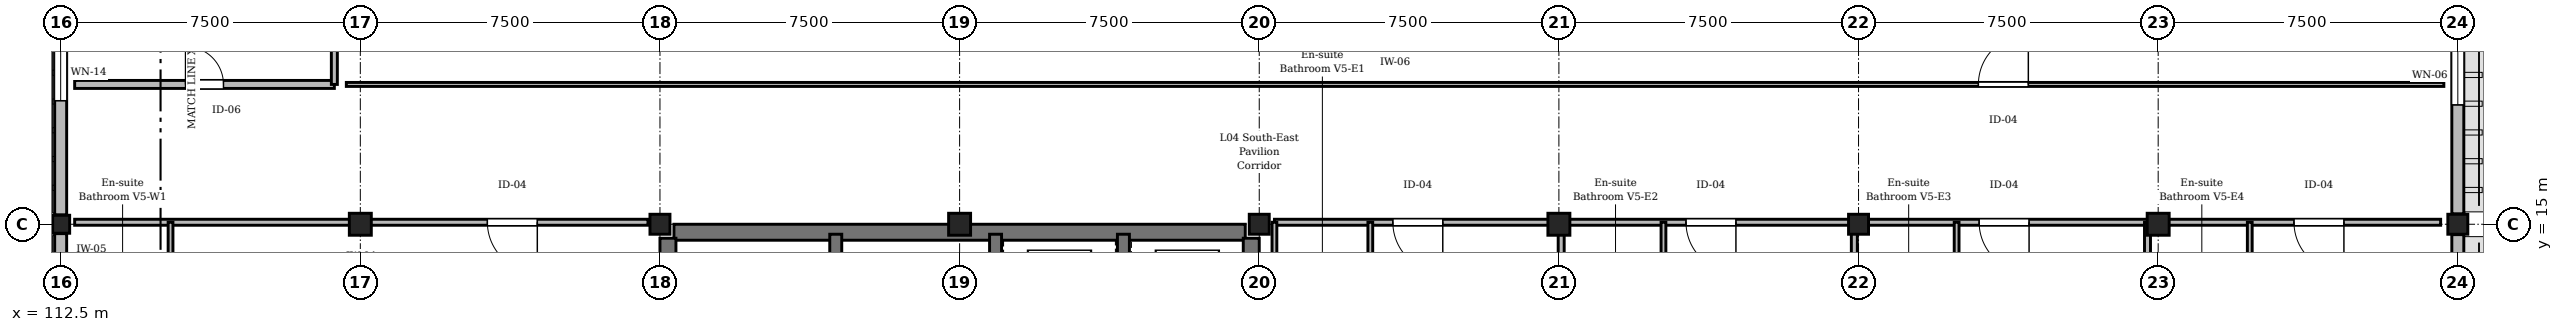
"""IFC4 building model, lengths in metres.
Left out: names, types, materials, properties, quantities, classifications, styles, units other than length and angle.
Written with IfcOpenShell. Run it as: python <this file> out.ifc"""

import sys

from ifc_helpers import new_model, si_unit, direction, frame, frame_2d, origin, origin_2d, place, context, subcontext, project, spatial, rectangle, extrude, element, fill, save


model = new_model("IFC4")
c1 = context("Model", 3, precision=1e-05, world=origin(), true_north=direction((0.0, 1.0)))
c2 = subcontext(c1, "Body", "Model", "MODEL_VIEW")
j1 = project(units=[si_unit("LENGTHUNIT", "METRE"), si_unit("PLANEANGLEUNIT", "RADIAN")], contexts=[c1])
p1 = place(None, origin())
s1 = spatial("IfcSite", under=j1, at=p1, CompositionType="ELEMENT")
p2 = place(p1, origin())
s2 = spatial("IfcBuilding", under=s1, at=p2, CompositionType="ELEMENT")
p3 = place(p2, frame((0.0, 0.0, 17.85)))
s3 = spatial("IfcBuildingStorey", under=s2, at=p3, CompositionType="ELEMENT", Elevation=17.85)
p4 = place(p3, frame((112.5, 15.0, 0.0), z_axis=(0.0, 0.0, 1.0), x_axis=(1.0, 0.0, 0.0)))
e1 = element("IfcColumn", 1, at=p4, inside=s3, PredefinedType="COLUMN", context=c2, shape_type="SweptSolid", body=[
    extrude(rectangle(XDim=0.45, YDim=0.45, at=origin_2d()), origin(), (0.0, 0.0, 1.0), 4.05),
])
p5 = place(p3, frame((120.0, 15.0, 0.0), z_axis=(0.0, 0.0, 1.0), x_axis=(1.0, 0.0, 0.0)))
e2 = element("IfcColumn", 2, at=p5, inside=s3, PredefinedType="COLUMN", context=c2, shape_type="SweptSolid", body=[
    extrude(rectangle(XDim=0.55, YDim=0.55, at=origin_2d()), origin(), (0.0, 0.0, 1.0), 4.05),
])
p6 = place(p3, frame((127.5, 15.0, 0.0), z_axis=(0.0, 0.0, 1.0), x_axis=(1.0, 0.0, 0.0)))
e3 = element("IfcColumn", 3, at=p6, inside=s3, PredefinedType="COLUMN", context=c2, shape_type="SweptSolid", body=[
    extrude(rectangle(XDim=0.5, YDim=0.5, at=origin_2d()), origin(), (0.0, 0.0, 1.0), 4.05),
])
p7 = place(p3, frame((135.0, 15.0, 0.0), z_axis=(0.0, 0.0, 1.0), x_axis=(1.0, 0.0, 0.0)))
e4 = element("IfcColumn", 4, at=p7, inside=s3, PredefinedType="COLUMN", context=c2, shape_type="SweptSolid", body=[
    extrude(rectangle(XDim=0.55, YDim=0.55, at=origin_2d()), origin(), (0.0, 0.0, 1.0), 4.05),
])
p8 = place(p3, frame((142.5, 15.0, 0.0), z_axis=(0.0, 0.0, 1.0), x_axis=(1.0, 0.0, 0.0)))
e5 = element("IfcColumn", 5, at=p8, inside=s3, PredefinedType="COLUMN", context=c2, shape_type="SweptSolid", body=[
    extrude(rectangle(XDim=0.5, YDim=0.5, at=origin_2d()), origin(), (0.0, 0.0, 1.0), 4.05),
])
p9 = place(p3, frame((150.0, 15.0, 0.0), z_axis=(0.0, 0.0, 1.0), x_axis=(1.0, 0.0, 0.0)))
e6 = element("IfcColumn", 6, at=p9, inside=s3, PredefinedType="COLUMN", context=c2, shape_type="SweptSolid", body=[
    extrude(rectangle(XDim=0.55, YDim=0.55, at=origin_2d()), origin(), (0.0, 0.0, 1.0), 4.05),
])
p10 = place(p3, frame((157.5, 15.0, 0.0), z_axis=(0.0, 0.0, 1.0), x_axis=(1.0, 0.0, 0.0)))
e7 = element("IfcColumn", 7, at=p10, inside=s3, PredefinedType="COLUMN", context=c2, shape_type="SweptSolid", body=[
    extrude(rectangle(XDim=0.5, YDim=0.5, at=origin_2d()), origin(), (0.0, 0.0, 1.0), 4.05),
])
p11 = place(p3, frame((165.0, 15.0, 0.0), z_axis=(0.0, 0.0, 1.0), x_axis=(1.0, 0.0, 0.0)))
e8 = element("IfcColumn", 8, at=p11, inside=s3, PredefinedType="COLUMN", context=c2, shape_type="SweptSolid", body=[
    extrude(rectangle(XDim=0.55, YDim=0.55, at=origin_2d()), origin(), (0.0, 0.0, 1.0), 4.05),
])
p12 = place(p3, frame((172.5, 15.0, 0.0), z_axis=(0.0, 0.0, 1.0), x_axis=(1.0, 0.0, 0.0)))
e9 = element("IfcColumn", 9, at=p12, inside=s3, PredefinedType="COLUMN", context=c2, shape_type="SweptSolid", body=[
    extrude(rectangle(XDim=0.5, YDim=0.5, at=origin_2d()), origin(), (0.0, 0.0, 1.0), 4.05),
])
p13 = place(p3, frame((112.5, 7.735, 0.0), z_axis=(0.0, 0.0, 1.0), x_axis=(0.0, 1.0, 0.0)))
e10 = element("IfcWall", 10, at=p13, inside=s3, PredefinedType="STANDARD", context=c2, shape_type="SweptSolid", body=[
    extrude(rectangle(XDim=7.03, YDim=0.3, at=frame_2d((3.515, 0.0))), origin(), (0.0, 0.0, 1.0), 3.17),
])
p14 = place(p13, frame((2.415, 0.0, 0.9)))
e11 = element("IfcOpeningElement", 11, at=p14, cuts=e10, PredefinedType="OPENING", context=c2, shape_type="SweptSolid", body=[
    extrude(rectangle(XDim=2.2, YDim=1.95, at=frame_2d((1.1, 0.975))), frame((0.0, 0.16, 0.0), z_axis=(0.0, -1.0, 0.0), x_axis=(1.0, 0.0, 0.0)), (0.0, 0.0, 1.0), 0.32),
])
p15 = place(p3, frame((112.5, 15.235, 0.0), z_axis=(0.0, 0.0, 1.0), x_axis=(0.0, 1.0, 0.0)))
e12 = element("IfcWall", 12, at=p15, inside=s3, PredefinedType="STANDARD", context=c2, shape_type="SweptSolid", body=[
    extrude(rectangle(XDim=7.115, YDim=0.3, at=frame_2d((3.558, 0.0))), origin(), (0.0, 0.0, 1.0), 3.17),
])
p16 = place(p15, frame((2.857, 0.0, 0.9)))
e13 = element("IfcOpeningElement", 13, at=p16, cuts=e12, PredefinedType="OPENING", context=c2, shape_type="SweptSolid", body=[
    extrude(rectangle(XDim=1.4, YDim=1.8, at=frame_2d((0.7, 0.9))), frame((0.0, 0.16, 0.0), z_axis=(0.0, -1.0, 0.0), x_axis=(1.0, 0.0, 0.0)), (0.0, 0.0, 1.0), 0.32),
])
p17 = place(p3, frame((172.5, 14.74, 0.0), z_axis=(0.0, 0.0, 1.0), x_axis=(0.0, -1.0, 0.0)))
e14 = element("IfcWall", 14, at=p17, inside=s3, PredefinedType="STANDARD", context=c2, shape_type="SweptSolid", body=[
    extrude(rectangle(XDim=6.955, YDim=0.3, at=frame_2d((3.478, 0.0))), origin(), (0.0, 0.0, 1.0), 3.17),
])
p18 = place(p17, frame((2.577, 0.0, 0.9)))
e15 = element("IfcOpeningElement", 15, at=p18, cuts=e14, PredefinedType="OPENING", context=c2, shape_type="SweptSolid", body=[
    extrude(rectangle(XDim=1.8, YDim=1.99, at=frame_2d((0.9, 0.995))), frame((0.0, 0.16, 0.0), z_axis=(0.0, -1.0, 0.0), x_axis=(1.0, 0.0, 0.0)), (0.0, 0.0, 1.0), 0.32),
])
p19 = place(p3, frame((172.5, 22.215, 0.0), z_axis=(0.0, 0.0, 1.0), x_axis=(0.0, -1.0, 0.0)))
e16 = element("IfcWall", 16, at=p19, inside=s3, PredefinedType="STANDARD", context=c2, shape_type="SweptSolid", body=[
    extrude(rectangle(XDim=6.955, YDim=0.3, at=frame_2d((3.478, 0.0))), origin(), (0.0, 0.0, 1.0), 3.17),
])
p20 = place(p19, frame((2.728, 0.0, 0.9)))
e17 = element("IfcOpeningElement", 17, at=p20, cuts=e16, PredefinedType="OPENING", context=c2, shape_type="SweptSolid", body=[
    extrude(rectangle(XDim=1.5, YDim=1.99, at=frame_2d((0.75, 0.995))), frame((0.0, 0.16, 0.0), z_axis=(0.0, -1.0, 0.0), x_axis=(1.0, 0.0, 0.0)), (0.0, 0.0, 1.0), 0.32),
])
p21 = place(p3, frame((127.85, 14.8, 0.0), z_axis=(0.0, 0.0, 1.0), x_axis=(1.0, 0.0, 0.0)))
e18 = element("IfcWall", 18, at=p21, inside=s3, PredefinedType="SHEAR", context=c2, shape_type="SweptSolid", body=[
    extrude(rectangle(XDim=14.3, YDim=0.4, at=frame_2d((7.15, 0.0))), origin(), (0.0, 0.0, 1.0), 3.77),
])
p22 = place(p3, frame((127.7, 7.85, 0.0), z_axis=(0.0, 0.0, 1.0), x_axis=(0.0, 1.0, 0.0)))
e19 = element("IfcWall", 19, at=p22, inside=s3, PredefinedType="SHEAR", context=c2, shape_type="SweptSolid", body=[
    extrude(rectangle(XDim=6.8, YDim=0.4, at=frame_2d((3.4, 0.0))), origin(), (0.0, 0.0, 1.0), 3.77),
])
p23 = place(p3, frame((142.3, 11.6, 0.0), z_axis=(0.0, 0.0, 1.0), x_axis=(0.0, 1.0, 0.0)))
e20 = element("IfcWall", 20, at=p23, inside=s3, PredefinedType="SHEAR", context=c2, shape_type="SweptSolid", body=[
    extrude(rectangle(XDim=3.05, YDim=0.4, at=frame_2d((1.525, 0.0))), origin(), (0.0, 0.0, 1.0), 3.77),
])
for number, where, z_axis, x_axis in (
    (21, (131.9, 11.6, 0.0), (0.0, 0.0, 1.0), (0.0, 1.0, 0.0)),
    (22, (135.9, 11.6, 0.0), (0.0, 0.0, 1.0), (0.0, 1.0, 0.0)),
    (23, (139.1, 11.6, 0.0), (0.0, 0.0, 1.0), (0.0, 1.0, 0.0)),
):
    element("IfcWall", number, at=place(p3, frame(where, z_axis=z_axis, x_axis=x_axis)), inside=s3, PredefinedType="SHEAR", context=c2, shape_type="SweptSolid", body=[
        extrude(rectangle(XDim=3.15, YDim=0.3, at=frame_2d((1.575, 0.0))), origin(), (0.0, 0.0, 1.0), 3.77),
    ])
p24 = place(p3, frame((127.2, 15.05, 0.0), z_axis=(0.0, 0.0, 1.0), x_axis=(-1.0, 0.0, 0.0)))
e24 = element("IfcWall", 24, at=p24, inside=s3, PredefinedType="PARTITIONING", context=c2, shape_type="SweptSolid", body=[
    extrude(rectangle(XDim=14.35, YDim=0.15, at=frame_2d((7.175, 0.0))), origin(), (0.0, 0.0, 1.0), 3.155),
])
p25 = place(p24, frame((2.77, 0.0, 0.0)))
e25 = element("IfcOpeningElement", 25, at=p25, cuts=e24, PredefinedType="OPENING", context=c2, shape_type="SweptSolid", body=[
    extrude(rectangle(XDim=1.25, YDim=2.2, at=frame_2d((0.625, 1.1))), frame((0.0, 0.085, 0.0), z_axis=(0.0, -1.0, 0.0), x_axis=(1.0, 0.0, 0.0)), (0.0, 0.0, 1.0), 0.17),
])
p26 = place(p3, frame((115.25, 13.05, 0.0), z_axis=(0.0, 0.0, 1.0), x_axis=(0.0, 1.0, 0.0)))
e26 = element("IfcWall", 26, at=p26, inside=s3, PredefinedType="PARTITIONING", context=c2, shape_type="SweptSolid", body=[
    extrude(rectangle(XDim=2.0, YDim=0.12, at=frame_2d((1.0, 0.0))), origin(), (0.0, 0.0, 1.0), 3.755),
])
p27 = place(p3, frame((150.058, 15.05, 0.0), z_axis=(0.0, 0.0, 1.0), x_axis=(-1.0, 0.0, 0.0)))
e27 = element("IfcWall", 27, at=p27, inside=s3, PredefinedType="PARTITIONING", context=c2, shape_type="SweptSolid", body=[
    extrude(rectangle(XDim=7.178, YDim=0.15, at=frame_2d((3.589, 0.0))), origin(), (0.0, 0.0, 1.0), 3.205),
])
p28 = place(p27, frame((2.964, 0.0, 0.0)))
e28 = element("IfcOpeningElement", 28, at=p28, cuts=e27, PredefinedType="OPENING", context=c2, shape_type="SweptSolid", body=[
    extrude(rectangle(XDim=1.25, YDim=2.2, at=frame_2d((0.625, 1.1))), frame((0.0, 0.085, 0.0), z_axis=(0.0, -1.0, 0.0), x_axis=(1.0, 0.0, 0.0)), (0.0, 0.0, 1.0), 0.17),
])
p29 = place(p3, frame((145.28, 13.05, 0.0), z_axis=(0.0, 0.0, 1.0), x_axis=(0.0, 1.0, 0.0)))
e29 = element("IfcWall", 29, at=p29, inside=s3, PredefinedType="PARTITIONING", context=c2, shape_type="SweptSolid", body=[
    extrude(rectangle(XDim=2.0, YDim=0.12, at=frame_2d((1.0, 0.0))), origin(), (0.0, 0.0, 1.0), 3.755),
])
p30 = place(p3, frame((157.395, 15.05, 0.0), z_axis=(0.0, 0.0, 1.0), x_axis=(-1.0, 0.0, 0.0)))
e30 = element("IfcWall", 30, at=p30, inside=s3, PredefinedType="PARTITIONING", context=c2, shape_type="SweptSolid", body=[
    extrude(rectangle(XDim=7.177, YDim=0.15, at=frame_2d((3.589, 0.0))), origin(), (0.0, 0.0, 1.0), 3.155),
])
p31 = place(p30, frame((2.964, 0.0, 0.0)))
e31 = element("IfcOpeningElement", 31, at=p31, cuts=e30, PredefinedType="OPENING", context=c2, shape_type="SweptSolid", body=[
    extrude(rectangle(XDim=1.25, YDim=2.2, at=frame_2d((0.625, 1.1))), frame((0.0, 0.085, 0.0), z_axis=(0.0, -1.0, 0.0), x_axis=(1.0, 0.0, 0.0)), (0.0, 0.0, 1.0), 0.17),
])
p32 = place(p3, frame((152.617, 13.05, 0.0), z_axis=(0.0, 0.0, 1.0), x_axis=(0.0, 1.0, 0.0)))
e32 = element("IfcWall", 32, at=p32, inside=s3, PredefinedType="PARTITIONING", context=c2, shape_type="SweptSolid", body=[
    extrude(rectangle(XDim=2.0, YDim=0.12, at=frame_2d((1.0, 0.0))), origin(), (0.0, 0.0, 1.0), 3.755),
])
p33 = place(p3, frame((164.732, 15.05, 0.0), z_axis=(0.0, 0.0, 1.0), x_axis=(-1.0, 0.0, 0.0)))
e33 = element("IfcWall", 33, at=p33, inside=s3, PredefinedType="PARTITIONING", context=c2, shape_type="SweptSolid", body=[
    extrude(rectangle(XDim=7.177, YDim=0.15, at=frame_2d((3.589, 0.0))), origin(), (0.0, 0.0, 1.0), 3.205),
])
p34 = place(p33, frame((2.964, 0.0, 0.0)))
e34 = element("IfcOpeningElement", 34, at=p34, cuts=e33, PredefinedType="OPENING", context=c2, shape_type="SweptSolid", body=[
    extrude(rectangle(XDim=1.25, YDim=2.2, at=frame_2d((0.625, 1.1))), frame((0.0, 0.085, 0.0), z_axis=(0.0, -1.0, 0.0), x_axis=(1.0, 0.0, 0.0)), (0.0, 0.0, 1.0), 0.17),
])
p35 = place(p3, frame((159.955, 13.05, 0.0), z_axis=(0.0, 0.0, 1.0), x_axis=(0.0, 1.0, 0.0)))
e35 = element("IfcWall", 35, at=p35, inside=s3, PredefinedType="PARTITIONING", context=c2, shape_type="SweptSolid", body=[
    extrude(rectangle(XDim=2.0, YDim=0.12, at=frame_2d((1.0, 0.0))), origin(), (0.0, 0.0, 1.0), 3.755),
])
p36 = place(p3, frame((172.07, 15.05, 0.0), z_axis=(0.0, 0.0, 1.0), x_axis=(-1.0, 0.0, 0.0)))
e36 = element("IfcWall", 36, at=p36, inside=s3, PredefinedType="PARTITIONING", context=c2, shape_type="SweptSolid", body=[
    extrude(rectangle(XDim=7.177, YDim=0.15, at=frame_2d((3.589, 0.0))), origin(), (0.0, 0.0, 1.0), 3.155),
])
p37 = place(p36, frame((2.421, 0.0, 0.0)))
e37 = element("IfcOpeningElement", 37, at=p37, cuts=e36, PredefinedType="OPENING", context=c2, shape_type="SweptSolid", body=[
    extrude(rectangle(XDim=1.25, YDim=2.2, at=frame_2d((0.625, 1.1))), frame((0.0, 0.085, 0.0), z_axis=(0.0, -1.0, 0.0), x_axis=(1.0, 0.0, 0.0)), (0.0, 0.0, 1.0), 0.17),
])
p38 = place(p3, frame((167.292, 13.05, 0.0), z_axis=(0.0, 0.0, 1.0), x_axis=(0.0, 1.0, 0.0)))
e38 = element("IfcWall", 38, at=p38, inside=s3, PredefinedType="PARTITIONING", context=c2, shape_type="SweptSolid", body=[
    extrude(rectangle(XDim=2.0, YDim=0.12, at=frame_2d((1.0, 0.0))), origin(), (0.0, 0.0, 1.0), 3.755),
])
p39 = place(p3, frame((112.85, 18.5, 0.0), z_axis=(0.0, 0.0, 1.0), x_axis=(1.0, 0.0, 0.0)))
e39 = element("IfcWall", 39, at=p39, inside=s3, PredefinedType="STANDARD", context=c2, shape_type="SweptSolid", body=[
    extrude(rectangle(XDim=6.5, YDim=0.2, at=frame_2d((3.25, 0.0))), origin(), (0.0, 0.0, 1.0), 3.755),
])
p40 = place(p39, frame((2.775, 0.0, 0.0)))
e40 = element("IfcOpeningElement", 40, at=p40, cuts=e39, PredefinedType="OPENING", context=c2, shape_type="SweptSolid", body=[
    extrude(rectangle(XDim=0.95, YDim=2.15, at=frame_2d((0.475, 1.075))), frame((0.0, 0.11, 0.0), z_axis=(0.0, -1.0, 0.0), x_axis=(1.0, 0.0, 0.0)), (0.0, 0.0, 1.0), 0.22),
])
p41 = place(p3, frame((119.65, 18.5, 0.0), z_axis=(0.0, 0.0, 1.0), x_axis=(1.0, 0.0, 0.0)))
e41 = element("IfcWall", 41, at=p41, inside=s3, PredefinedType="PARTITIONING", context=c2, shape_type="SweptSolid", body=[
    extrude(rectangle(XDim=52.5, YDim=0.1, at=frame_2d((26.25, 0.0))), origin(), (0.0, 0.0, 1.0), 3.755),
])
p42 = place(p41, frame((40.85, 0.0, 0.0)))
e42 = element("IfcOpeningElement", 42, at=p42, cuts=e41, PredefinedType="OPENING", context=c2, shape_type="SweptSolid", body=[
    extrude(rectangle(XDim=1.25, YDim=2.2, at=frame_2d((0.625, 1.1))), frame((0.0, 0.06, 0.0), z_axis=(0.0, -1.0, 0.0), x_axis=(1.0, 0.0, 0.0)), (0.0, 0.0, 1.0), 0.12),
])
p43 = place(p3, frame((150.058, 7.85, 0.0), z_axis=(0.0, 0.0, 1.0), x_axis=(0.0, 1.0, 0.0)))
e43 = element("IfcWall", 43, at=p43, inside=s3, PredefinedType="PARTITIONING", context=c2, shape_type="SweptSolid", body=[
    extrude(rectangle(XDim=7.2, YDim=0.15, at=frame_2d((3.6, 0.0))), origin(), (0.0, 0.0, 1.0), 3.255),
])
p44 = place(p3, frame((157.395, 7.85, 0.0), z_axis=(0.0, 0.0, 1.0), x_axis=(0.0, 1.0, 0.0)))
e44 = element("IfcWall", 44, at=p44, inside=s3, PredefinedType="PARTITIONING", context=c2, shape_type="SweptSolid", body=[
    extrude(rectangle(XDim=7.2, YDim=0.15, at=frame_2d((3.6, 0.0))), origin(), (0.0, 0.0, 1.0), 3.205),
])
p45 = place(p3, frame((164.732, 7.85, 0.0), z_axis=(0.0, 0.0, 1.0), x_axis=(0.0, 1.0, 0.0)))
e45 = element("IfcWall", 45, at=p45, inside=s3, PredefinedType="PARTITIONING", context=c2, shape_type="SweptSolid", body=[
    extrude(rectangle(XDim=7.2, YDim=0.15, at=frame_2d((3.6, 0.0))), origin(), (0.0, 0.0, 1.0), 3.255),
])
p46 = place(p3, frame((119.35, 18.5, 0.0), z_axis=(0.0, 0.0, 1.0), x_axis=(0.0, 1.0, 0.0)))
e46 = element("IfcWall", 46, at=p46, inside=s3, PredefinedType="PARTITIONING", context=c2, shape_type="SweptSolid", body=[
    extrude(rectangle(XDim=3.65, YDim=0.15, at=frame_2d((1.825, 0.0))), origin(), (0.0, 0.0, 1.0), 3.755),
])
p47 = place(p3, frame((142.88, 13.05, 0.0), z_axis=(0.0, 0.0, 1.0), x_axis=(0.0, 1.0, 0.0)))
e47 = element("IfcWall", 47, at=p47, inside=s3, PredefinedType="PARTITIONING", context=c2, shape_type="SweptSolid", body=[
    extrude(rectangle(XDim=2.0, YDim=0.12, at=frame_2d((1.0, 0.0))), origin(), (0.0, 0.0, 1.0), 3.205),
])
p48 = place(p16, origin())
e48 = element("IfcWindow", 48, at=p48, inside=s3, PartitioningType="SINGLE_PANEL", PredefinedType="WINDOW", context=c2, shape_type="SweptSolid", body=[
    extrude(rectangle(XDim=1.4, YDim=1.8, at=frame_2d((0.7, 0.9))), frame((0.0, 0.03, 0.0), z_axis=(0.0, -1.0, 0.0), x_axis=(1.0, 0.0, 0.0)), (0.0, 0.0, 1.0), 0.06),
])
fill(e13, e48)
p49 = place(p20, origin())
e49 = element("IfcWindow", 49, at=p49, inside=s3, PartitioningType="SINGLE_PANEL", PredefinedType="WINDOW", context=c2, shape_type="SweptSolid", body=[
    extrude(rectangle(XDim=1.5, YDim=1.99, at=frame_2d((0.75, 0.995))), frame((0.0, 0.03, 0.0), z_axis=(0.0, -1.0, 0.0), x_axis=(1.0, 0.0, 0.0)), (0.0, 0.0, 1.0), 0.06),
])
fill(e17, e49)
p50 = place(p25, origin())
e50 = element("IfcDoor", 50, at=p50, inside=s3, OperationType="SINGLE_SWING_LEFT", PredefinedType="DOOR", context=c2, shape_type="SweptSolid", body=[
    extrude(rectangle(XDim=1.25, YDim=2.2, at=frame_2d((0.625, 1.1))), frame((0.0, 0.025, 0.0), z_axis=(0.0, -1.0, 0.0), x_axis=(1.0, 0.0, 0.0)), (0.0, 0.0, 1.0), 0.05),
])
fill(e25, e50)
p51 = place(p28, origin())
e51 = element("IfcDoor", 51, at=p51, inside=s3, OperationType="SINGLE_SWING_LEFT", PredefinedType="DOOR", context=c2, shape_type="SweptSolid", body=[
    extrude(rectangle(XDim=1.25, YDim=2.2, at=frame_2d((0.625, 1.1))), frame((0.0, 0.025, 0.0), z_axis=(0.0, -1.0, 0.0), x_axis=(1.0, 0.0, 0.0)), (0.0, 0.0, 1.0), 0.05),
])
fill(e28, e51)
p52 = place(p31, origin())
e52 = element("IfcDoor", 52, at=p52, inside=s3, OperationType="SINGLE_SWING_LEFT", PredefinedType="DOOR", context=c2, shape_type="SweptSolid", body=[
    extrude(rectangle(XDim=1.25, YDim=2.2, at=frame_2d((0.625, 1.1))), frame((0.0, 0.025, 0.0), z_axis=(0.0, -1.0, 0.0), x_axis=(1.0, 0.0, 0.0)), (0.0, 0.0, 1.0), 0.05),
])
fill(e31, e52)
p53 = place(p34, origin())
e53 = element("IfcDoor", 53, at=p53, inside=s3, OperationType="SINGLE_SWING_LEFT", PredefinedType="DOOR", context=c2, shape_type="SweptSolid", body=[
    extrude(rectangle(XDim=1.25, YDim=2.2, at=frame_2d((0.625, 1.1))), frame((0.0, 0.025, 0.0), z_axis=(0.0, -1.0, 0.0), x_axis=(1.0, 0.0, 0.0)), (0.0, 0.0, 1.0), 0.05),
])
fill(e34, e53)
p54 = place(p37, origin())
e54 = element("IfcDoor", 54, at=p54, inside=s3, OperationType="SINGLE_SWING_LEFT", PredefinedType="DOOR", context=c2, shape_type="SweptSolid", body=[
    extrude(rectangle(XDim=1.25, YDim=2.2, at=frame_2d((0.625, 1.1))), frame((0.0, 0.025, 0.0), z_axis=(0.0, -1.0, 0.0), x_axis=(1.0, 0.0, 0.0)), (0.0, 0.0, 1.0), 0.05),
])
fill(e37, e54)
p55 = place(p40, origin())
e55 = element("IfcDoor", 55, at=p55, inside=s3, OperationType="SINGLE_SWING_LEFT", PredefinedType="DOOR", context=c2, shape_type="SweptSolid", body=[
    extrude(rectangle(XDim=0.95, YDim=2.15, at=frame_2d((0.475, 1.075))), frame((0.0, 0.025, 0.0), z_axis=(0.0, -1.0, 0.0), x_axis=(1.0, 0.0, 0.0)), (0.0, 0.0, 1.0), 0.05),
])
fill(e40, e55)
p56 = place(p42, origin())
e56 = element("IfcDoor", 56, at=p56, inside=s3, OperationType="SINGLE_SWING_RIGHT", PredefinedType="DOOR", context=c2, shape_type="SweptSolid", body=[
    extrude(rectangle(XDim=1.25, YDim=2.2, at=frame_2d((0.625, 1.1))), frame((0.0, 0.025, 0.0), z_axis=(0.0, -1.0, 0.0), x_axis=(1.0, 0.0, 0.0)), (0.0, 0.0, 1.0), 0.05),
])
fill(e42, e56)
save(model, sys.argv[1])
